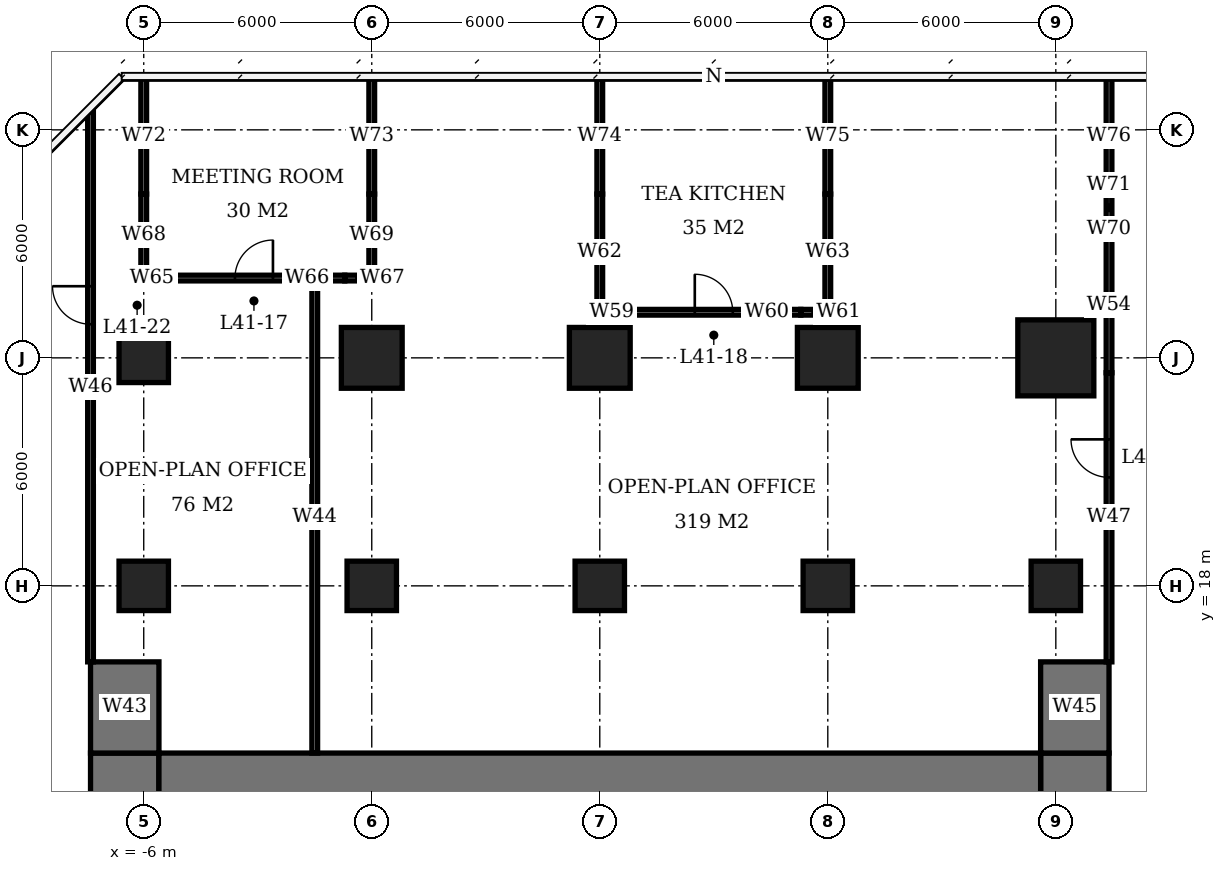
"""IFC4 building model, lengths in metres.
Left out: names, types, materials, properties, quantities, classifications, styles, units other than length and angle.
Written with IfcOpenShell. Run it as: python <this file> out.ifc"""

import sys

from ifc_helpers import new_model, si_unit, direction, frame, frame_2d, origin, origin_2d, place, context, subcontext, project, spatial, rectangle, extrude, element, fill, save


model = new_model("IFC4")
c1 = context("Model", 3, precision=1e-05, world=origin(), true_north=direction((0.0, 1.0)))
c2 = subcontext(c1, "Body", "Model", "MODEL_VIEW")
j1 = project(units=[si_unit("LENGTHUNIT", "METRE"), si_unit("PLANEANGLEUNIT", "RADIAN")], contexts=[c1])
p1 = place(None, origin())
s1 = spatial("IfcSite", under=j1, at=p1, CompositionType="ELEMENT")
p2 = place(p1, origin())
s2 = spatial("IfcBuilding", under=s1, at=p2, CompositionType="ELEMENT")
p3 = place(p2, frame((0.0, 0.0, 169.4)))
s3 = spatial("IfcBuildingStorey", under=s2, at=p3, CompositionType="ELEMENT", Elevation=169.4)
for number, where, z_axis, x_axis in (
    (1, (-6.0, 18.0, 0.0), (0.0, 0.0, 1.0), (1.0, 0.0, 0.0)),
    (2, (-6.0, 24.0, 0.0), (0.0, 0.0, 1.0), (1.0, 0.0, 0.0)),
    (3, (0.0, 18.0, 0.0), (0.0, 0.0, 1.0), (1.0, 0.0, 0.0)),
):
    element("IfcColumn", number, at=place(p3, frame(where, z_axis=z_axis, x_axis=x_axis)), inside=s3, PredefinedType="COLUMN", context=c2, shape_type="SweptSolid", body=[
        extrude(rectangle(XDim=1.3, YDim=1.3, at=origin_2d()), origin(), (0.0, 0.0, 1.0), 3.9),
    ])
p4 = place(p3, frame((0.0, 24.0, 0.0), z_axis=(0.0, 0.0, 1.0), x_axis=(1.0, 0.0, 0.0)))
e4 = element("IfcColumn", 4, at=p4, inside=s3, PredefinedType="COLUMN", context=c2, shape_type="SweptSolid", body=[
    extrude(rectangle(XDim=1.6, YDim=1.6, at=origin_2d()), origin(), (0.0, 0.0, 1.0), 3.9),
])
p5 = place(p3, frame((6.0, 18.0, 0.0), z_axis=(0.0, 0.0, 1.0), x_axis=(1.0, 0.0, 0.0)))
e5 = element("IfcColumn", 5, at=p5, inside=s3, PredefinedType="COLUMN", context=c2, shape_type="SweptSolid", body=[
    extrude(rectangle(XDim=1.3, YDim=1.3, at=origin_2d()), origin(), (0.0, 0.0, 1.0), 3.9),
])
p6 = place(p3, frame((6.0, 24.0, 0.0), z_axis=(0.0, 0.0, 1.0), x_axis=(1.0, 0.0, 0.0)))
e6 = element("IfcColumn", 6, at=p6, inside=s3, PredefinedType="COLUMN", context=c2, shape_type="SweptSolid", body=[
    extrude(rectangle(XDim=1.6, YDim=1.6, at=origin_2d()), origin(), (0.0, 0.0, 1.0), 3.9),
])
p7 = place(p3, frame((12.0, 18.0, 0.0), z_axis=(0.0, 0.0, 1.0), x_axis=(1.0, 0.0, 0.0)))
e7 = element("IfcColumn", 7, at=p7, inside=s3, PredefinedType="COLUMN", context=c2, shape_type="SweptSolid", body=[
    extrude(rectangle(XDim=1.3, YDim=1.3, at=origin_2d()), origin(), (0.0, 0.0, 1.0), 3.9),
])
p8 = place(p3, frame((12.0, 24.0, 0.0), z_axis=(0.0, 0.0, 1.0), x_axis=(1.0, 0.0, 0.0)))
e8 = element("IfcColumn", 8, at=p8, inside=s3, PredefinedType="COLUMN", context=c2, shape_type="SweptSolid", body=[
    extrude(rectangle(XDim=1.6, YDim=1.6, at=origin_2d()), origin(), (0.0, 0.0, 1.0), 3.9),
])
p9 = place(p3, frame((18.0, 18.0, 0.0), z_axis=(0.0, 0.0, 1.0), x_axis=(1.0, 0.0, 0.0)))
e9 = element("IfcColumn", 9, at=p9, inside=s3, PredefinedType="COLUMN", context=c2, shape_type="SweptSolid", body=[
    extrude(rectangle(XDim=1.3, YDim=1.3, at=origin_2d()), origin(), (0.0, 0.0, 1.0), 3.9),
])
p10 = place(p3, frame((18.0, 24.0, 0.0), z_axis=(0.0, 0.0, 1.0), x_axis=(1.0, 0.0, 0.0)))
e10 = element("IfcColumn", 10, at=p10, inside=s3, PredefinedType="COLUMN", context=c2, shape_type="SweptSolid", body=[
    extrude(rectangle(XDim=2.0, YDim=2.0, at=origin_2d()), origin(), (0.0, 0.0, 1.0), 3.9),
])
p11 = place(p3, frame((-5.6, 12.6, 0.0), z_axis=(0.0, 0.0, 1.0), x_axis=(1.0, 0.0, 0.0)))
e11 = element("IfcWall", 11, at=p11, inside=s3, PredefinedType="SHEAR", context=c2, shape_type="SweptSolid", body=[
    extrude(rectangle(XDim=23.2, YDim=2.0, at=frame_2d((11.6, 0.0))), origin(), (0.0, 0.0, 1.0), 3.9),
])
p12 = place(p3, frame((-6.5, -7.6, 0.0), z_axis=(0.0, 0.0, 1.0), x_axis=(0.0, 1.0, 0.0)))
e12 = element("IfcWall", 12, at=p12, inside=s3, PredefinedType="SHEAR", context=c2, shape_type="SweptSolid", body=[
    extrude(rectangle(XDim=21.2, YDim=1.8, at=frame_2d((10.6, 0.0))), origin(), (0.0, 0.0, 1.0), 3.9),
])
p13 = place(p12, frame((7.8, 0.0, 0.0)))
e13 = element("IfcOpeningElement", 13, at=p13, cuts=e12, PredefinedType="OPENING", context=c2, shape_type="SweptSolid", body=[
    extrude(rectangle(XDim=1.8, YDim=2.4, at=frame_2d((0.9, 1.2))), frame((0.0, 0.91, 0.0), z_axis=(0.0, -1.0, 0.0), x_axis=(1.0, 0.0, 0.0)), (0.0, 0.0, 1.0), 1.82),
])
p14 = place(p3, frame((18.5, -7.6, 0.0), z_axis=(0.0, 0.0, 1.0), x_axis=(0.0, 1.0, 0.0)))
e14 = element("IfcWall", 14, at=p14, inside=s3, PredefinedType="SHEAR", context=c2, shape_type="SweptSolid", body=[
    extrude(rectangle(XDim=21.2, YDim=1.8, at=frame_2d((10.6, 0.0))), origin(), (0.0, 0.0, 1.0), 3.9),
])
p15 = place(p14, frame((9.2, 0.0, 0.0)))
e15 = element("IfcOpeningElement", 15, at=p15, cuts=e14, PredefinedType="OPENING", context=c2, shape_type="SweptSolid", body=[
    extrude(rectangle(XDim=1.8, YDim=2.4, at=frame_2d((0.9, 1.2))), frame((0.0, 0.91, 0.0), z_axis=(0.0, -1.0, 0.0), x_axis=(1.0, 0.0, 0.0)), (0.0, 0.0, 1.0), 1.82),
])
for number, where, z_axis, x_axis in (
    (16, (-6.5, 13.6, 0.0), (0.0, 0.0, 1.0), (0.0, 1.0, 0.0)),
    (17, (18.5, 13.6, 0.0), (0.0, 0.0, 1.0), (0.0, 1.0, 0.0)),
):
    element("IfcWall", number, at=place(p3, frame(where, z_axis=z_axis, x_axis=x_axis)), inside=s3, PredefinedType="SHEAR", context=c2, shape_type="SweptSolid", body=[
        extrude(rectangle(XDim=2.4, YDim=1.8, at=frame_2d((1.2, 0.0))), origin(), (0.0, 0.0, 1.0), 3.9),
    ])
p16 = place(p3, frame((5.925, 25.2, 0.0), z_axis=(0.0, 0.0, 1.0), x_axis=(1.0, 0.0, 0.0)))
e18 = element("IfcWall", 18, at=p16, inside=s3, PredefinedType="PARTITIONING", context=c2, shape_type="SweptSolid", body=[
    extrude(rectangle(XDim=0.785, YDim=0.15, at=frame_2d((0.393, 0.0))), origin(), (0.0, 0.0, 1.0), 2.65),
])
p17 = place(p3, frame((6.71, 25.2, 0.0), z_axis=(0.0, 0.0, 1.0), x_axis=(1.0, 0.0, 0.0)))
e19 = element("IfcWall", 19, at=p17, inside=s3, PredefinedType="PARTITIONING", context=c2, shape_type="SweptSolid", body=[
    extrude(rectangle(XDim=4.58, YDim=0.15, at=frame_2d((2.29, 0.0))), origin(), (0.0, 0.0, 1.0), 3.65),
])
p18 = place(p17, frame((1.79, 0.0, 0.0)))
e20 = element("IfcOpeningElement", 20, at=p18, cuts=e19, PredefinedType="OPENING", context=c2, shape_type="SweptSolid", body=[
    extrude(rectangle(XDim=1.0, YDim=2.1, at=frame_2d((0.5, 1.05))), frame((0.0, 0.085, 0.0), z_axis=(0.0, -1.0, 0.0), x_axis=(1.0, 0.0, 0.0)), (0.0, 0.0, 1.0), 0.17),
])
p19 = place(p3, frame((11.29, 25.2, 0.0), z_axis=(0.0, 0.0, 1.0), x_axis=(1.0, 0.0, 0.0)))
e21 = element("IfcWall", 21, at=p19, inside=s3, PredefinedType="PARTITIONING", context=c2, shape_type="SweptSolid", body=[
    extrude(rectangle(XDim=0.785, YDim=0.15, at=frame_2d((0.393, 0.0))), origin(), (0.0, 0.0, 1.0), 2.65),
])
p20 = place(p3, frame((-6.075, 26.1, 0.0), z_axis=(0.0, 0.0, 1.0), x_axis=(1.0, 0.0, 0.0)))
e22 = element("IfcWall", 22, at=p20, inside=s3, PredefinedType="PARTITIONING", context=c2, shape_type="SweptSolid", body=[
    extrude(rectangle(XDim=0.585, YDim=0.15, at=frame_2d((0.292, 0.0))), origin(), (0.0, 0.0, 1.0), 2.65),
])
p21 = place(p3, frame((-5.49, 26.1, 0.0), z_axis=(0.0, 0.0, 1.0), x_axis=(1.0, 0.0, 0.0)))
e23 = element("IfcWall", 23, at=p21, inside=s3, PredefinedType="PARTITIONING", context=c2, shape_type="SweptSolid", body=[
    extrude(rectangle(XDim=4.78, YDim=0.15, at=frame_2d((2.39, 0.0))), origin(), (0.0, 0.0, 1.0), 3.65),
])
p22 = place(p21, frame((1.89, 0.0, 0.0)))
e24 = element("IfcOpeningElement", 24, at=p22, cuts=e23, PredefinedType="OPENING", context=c2, shape_type="SweptSolid", body=[
    extrude(rectangle(XDim=1.0, YDim=2.1, at=frame_2d((0.5, 1.05))), frame((0.0, 0.085, 0.0), z_axis=(0.0, -1.0, 0.0), x_axis=(1.0, 0.0, 0.0)), (0.0, 0.0, 1.0), 0.17),
])
p23 = place(p3, frame((-0.71, 26.1, 0.0), z_axis=(0.0, 0.0, 1.0), x_axis=(1.0, 0.0, 0.0)))
e25 = element("IfcWall", 25, at=p23, inside=s3, PredefinedType="PARTITIONING", context=c2, shape_type="SweptSolid", body=[
    extrude(rectangle(XDim=0.785, YDim=0.15, at=frame_2d((0.393, 0.0))), origin(), (0.0, 0.0, 1.0), 2.65),
])
p24 = place(p3, frame((-6.0, 26.175, 0.0), z_axis=(0.0, 0.0, 1.0), x_axis=(0.0, 1.0, 0.0)))
e26 = element("IfcWall", 26, at=p24, inside=s3, PredefinedType="PARTITIONING", context=c2, shape_type="SweptSolid", body=[
    extrude(rectangle(XDim=2.135, YDim=0.15, at=frame_2d((1.067, 0.0))), origin(), (0.0, 0.0, 1.0), 2.65),
])
p25 = place(p3, frame((-6.0, 28.31, 0.0), z_axis=(0.0, 0.0, 1.0), x_axis=(0.0, 1.0, 0.0)))
e27 = element("IfcWall", 27, at=p25, inside=s3, PredefinedType="PARTITIONING", context=c2, shape_type="SweptSolid", body=[
    extrude(rectangle(XDim=3.065, YDim=0.15, at=frame_2d((1.532, 0.0))), origin(), (0.0, 0.0, 1.0), 3.65),
])
p26 = place(p3, frame((0.0, 26.175, 0.0), z_axis=(0.0, 0.0, 1.0), x_axis=(0.0, 1.0, 0.0)))
e28 = element("IfcWall", 28, at=p26, inside=s3, PredefinedType="PARTITIONING", context=c2, shape_type="SweptSolid", body=[
    extrude(rectangle(XDim=2.135, YDim=0.15, at=frame_2d((1.067, 0.0))), origin(), (0.0, 0.0, 1.0), 2.65),
])
p27 = place(p3, frame((0.0, 28.31, 0.0), z_axis=(0.0, 0.0, 1.0), x_axis=(0.0, 1.0, 0.0)))
e29 = element("IfcWall", 29, at=p27, inside=s3, PredefinedType="PARTITIONING", context=c2, shape_type="SweptSolid", body=[
    extrude(rectangle(XDim=3.065, YDim=0.15, at=frame_2d((1.532, 0.0))), origin(), (0.0, 0.0, 1.0), 3.65),
])
p28 = place(p3, frame((6.0, 25.275, 0.0), z_axis=(0.0, 0.0, 1.0), x_axis=(0.0, 1.0, 0.0)))
e30 = element("IfcWall", 30, at=p28, inside=s3, PredefinedType="PARTITIONING", context=c2, shape_type="SweptSolid", body=[
    extrude(rectangle(XDim=3.035, YDim=0.15, at=frame_2d((1.518, 0.0))), origin(), (0.0, 0.0, 1.0), 2.65),
])
p29 = place(p3, frame((6.0, 28.31, 0.0), z_axis=(0.0, 0.0, 1.0), x_axis=(0.0, 1.0, 0.0)))
e31 = element("IfcWall", 31, at=p29, inside=s3, PredefinedType="PARTITIONING", context=c2, shape_type="SweptSolid", body=[
    extrude(rectangle(XDim=3.04, YDim=0.15, at=frame_2d((1.52, 0.0))), origin(), (0.0, 0.0, 1.0), 3.65),
])
p30 = place(p3, frame((12.0, 25.275, 0.0), z_axis=(0.0, 0.0, 1.0), x_axis=(0.0, 1.0, 0.0)))
e32 = element("IfcWall", 32, at=p30, inside=s3, PredefinedType="PARTITIONING", context=c2, shape_type="SweptSolid", body=[
    extrude(rectangle(XDim=3.035, YDim=0.15, at=frame_2d((1.518, 0.0))), origin(), (0.0, 0.0, 1.0), 2.65),
])
p31 = place(p3, frame((12.0, 28.31, 0.0), z_axis=(0.0, 0.0, 1.0), x_axis=(0.0, 1.0, 0.0)))
e33 = element("IfcWall", 33, at=p31, inside=s3, PredefinedType="PARTITIONING", context=c2, shape_type="SweptSolid", body=[
    extrude(rectangle(XDim=3.04, YDim=0.15, at=frame_2d((1.52, 0.0))), origin(), (0.0, 0.0, 1.0), 3.65),
])
p32 = place(p3, frame((-7.4, 16.0, 0.0), z_axis=(0.0, 0.0, 1.0), x_axis=(0.0, 1.0, 0.0)))
e34 = element("IfcWall", 34, at=p32, inside=s3, PredefinedType="PARTITIONING", context=c2, shape_type="SweptSolid", body=[
    extrude(rectangle(XDim=14.489, YDim=0.15, at=frame_2d((7.245, 0.0))), origin(), (0.0, 0.0, 1.0), 3.65),
])
p33 = place(p32, frame((8.885, 0.0, 0.0)))
e35 = element("IfcOpeningElement", 35, at=p33, cuts=e34, PredefinedType="OPENING", context=c2, shape_type="SweptSolid", body=[
    extrude(rectangle(XDim=1.0, YDim=2.1, at=frame_2d((0.5, 1.05))), frame((0.0, 0.085, 0.0), z_axis=(0.0, -1.0, 0.0), x_axis=(1.0, 0.0, 0.0)), (0.0, 0.0, 1.0), 0.17),
])
p34 = place(p3, frame((-1.5, 13.6, 0.0), z_axis=(0.0, 0.0, 1.0), x_axis=(0.0, 1.0, 0.0)))
e36 = element("IfcWall", 36, at=p34, inside=s3, PredefinedType="PARTITIONING", context=c2, shape_type="SweptSolid", body=[
    extrude(rectangle(XDim=12.425, YDim=0.15, at=frame_2d((6.212, 0.0))), origin(), (0.0, 0.0, 1.0), 3.65),
])
p35 = place(p3, frame((19.4, 16.0, 0.0), z_axis=(0.0, 0.0, 1.0), x_axis=(0.0, 1.0, 0.0)))
e37 = element("IfcWall", 37, at=p35, inside=s3, PredefinedType="PARTITIONING", context=c2, shape_type="SweptSolid", body=[
    extrude(rectangle(XDim=7.608, YDim=0.15, at=frame_2d((3.804, 0.0))), origin(), (0.0, 0.0, 1.0), 3.65),
])
p36 = place(p35, frame((4.855, 0.0, 0.0)))
e38 = element("IfcOpeningElement", 38, at=p36, cuts=e37, PredefinedType="OPENING", context=c2, shape_type="SweptSolid", body=[
    extrude(rectangle(XDim=1.0, YDim=2.1, at=frame_2d((0.5, 1.05))), frame((0.0, 0.085, 0.0), z_axis=(0.0, -1.0, 0.0), x_axis=(1.0, 0.0, 0.0)), (0.0, 0.0, 1.0), 0.17),
])
p37 = place(p3, frame((19.4, 23.608, 0.0), z_axis=(0.0, 0.0, 1.0), x_axis=(0.0, 1.0, 0.0)))
e39 = element("IfcWall", 39, at=p37, inside=s3, PredefinedType="PARTITIONING", context=c2, shape_type="SweptSolid", body=[
    extrude(rectangle(XDim=3.584, YDim=0.15, at=frame_2d((1.792, 0.0))), origin(), (0.0, 0.0, 1.0), 2.65),
])
p38 = place(p3, frame((19.4, 27.192, 0.0), z_axis=(0.0, 0.0, 1.0), x_axis=(0.0, 1.0, 0.0)))
e40 = element("IfcWall", 40, at=p38, inside=s3, PredefinedType="PARTITIONING", context=c2, shape_type="SweptSolid", body=[
    extrude(rectangle(XDim=0.398, YDim=0.15, at=frame_2d((0.199, 0.0))), origin(), (0.0, 0.0, 1.0), 3.65),
])
p39 = place(p3, frame((19.4, 27.59, 0.0), z_axis=(0.0, 0.0, 1.0), x_axis=(0.0, 1.0, 0.0)))
e41 = element("IfcWall", 41, at=p39, inside=s3, PredefinedType="PARTITIONING", context=c2, shape_type="SweptSolid", body=[
    extrude(rectangle(XDim=0.72, YDim=0.15, at=frame_2d((0.36, 0.0))), origin(), (0.0, 0.0, 1.0), 2.65),
])
p40 = place(p3, frame((19.4, 28.31, 0.0), z_axis=(0.0, 0.0, 1.0), x_axis=(0.0, 1.0, 0.0)))
e42 = element("IfcWall", 42, at=p40, inside=s3, PredefinedType="PARTITIONING", context=c2, shape_type="SweptSolid", body=[
    extrude(rectangle(XDim=3.065, YDim=0.15, at=frame_2d((1.532, 0.0))), origin(), (0.0, 0.0, 1.0), 3.65),
])
p41 = place(p22, origin())
e43 = element("IfcDoor", 43, at=p41, inside=s3, OperationType="SINGLE_SWING_RIGHT", PredefinedType="DOOR", context=c2, shape_type="SweptSolid", body=[
    extrude(rectangle(XDim=1.0, YDim=2.1, at=frame_2d((0.5, 1.05))), frame((0.0, 0.025, 0.0), z_axis=(0.0, -1.0, 0.0), x_axis=(1.0, 0.0, 0.0)), (0.0, 0.0, 1.0), 0.05),
])
fill(e24, e43)
p42 = place(p18, origin())
e44 = element("IfcDoor", 44, at=p42, inside=s3, OperationType="SINGLE_SWING_LEFT", PredefinedType="DOOR", context=c2, shape_type="SweptSolid", body=[
    extrude(rectangle(XDim=1.0, YDim=2.1, at=frame_2d((0.5, 1.05))), frame((0.0, 0.025, 0.0), z_axis=(0.0, -1.0, 0.0), x_axis=(1.0, 0.0, 0.0)), (0.0, 0.0, 1.0), 0.05),
])
fill(e20, e44)
p43 = place(p33, origin())
e45 = element("IfcDoor", 45, at=p43, inside=s3, OperationType="SINGLE_SWING_RIGHT", PredefinedType="DOOR", context=c2, shape_type="SweptSolid", body=[
    extrude(rectangle(XDim=1.0, YDim=2.1, at=frame_2d((0.5, 1.05))), frame((0.0, 0.025, 0.0), z_axis=(0.0, -1.0, 0.0), x_axis=(1.0, 0.0, 0.0)), (0.0, 0.0, 1.0), 0.05),
])
fill(e35, e45)
p44 = place(p36, origin())
e46 = element("IfcDoor", 46, at=p44, inside=s3, OperationType="SINGLE_SWING_RIGHT", PredefinedType="DOOR", context=c2, shape_type="SweptSolid", body=[
    extrude(rectangle(XDim=1.0, YDim=2.1, at=frame_2d((0.5, 1.05))), frame((0.0, 0.025, 0.0), z_axis=(0.0, -1.0, 0.0), x_axis=(1.0, 0.0, 0.0)), (0.0, 0.0, 1.0), 0.05),
])
fill(e38, e46)
save(model, sys.argv[1])
